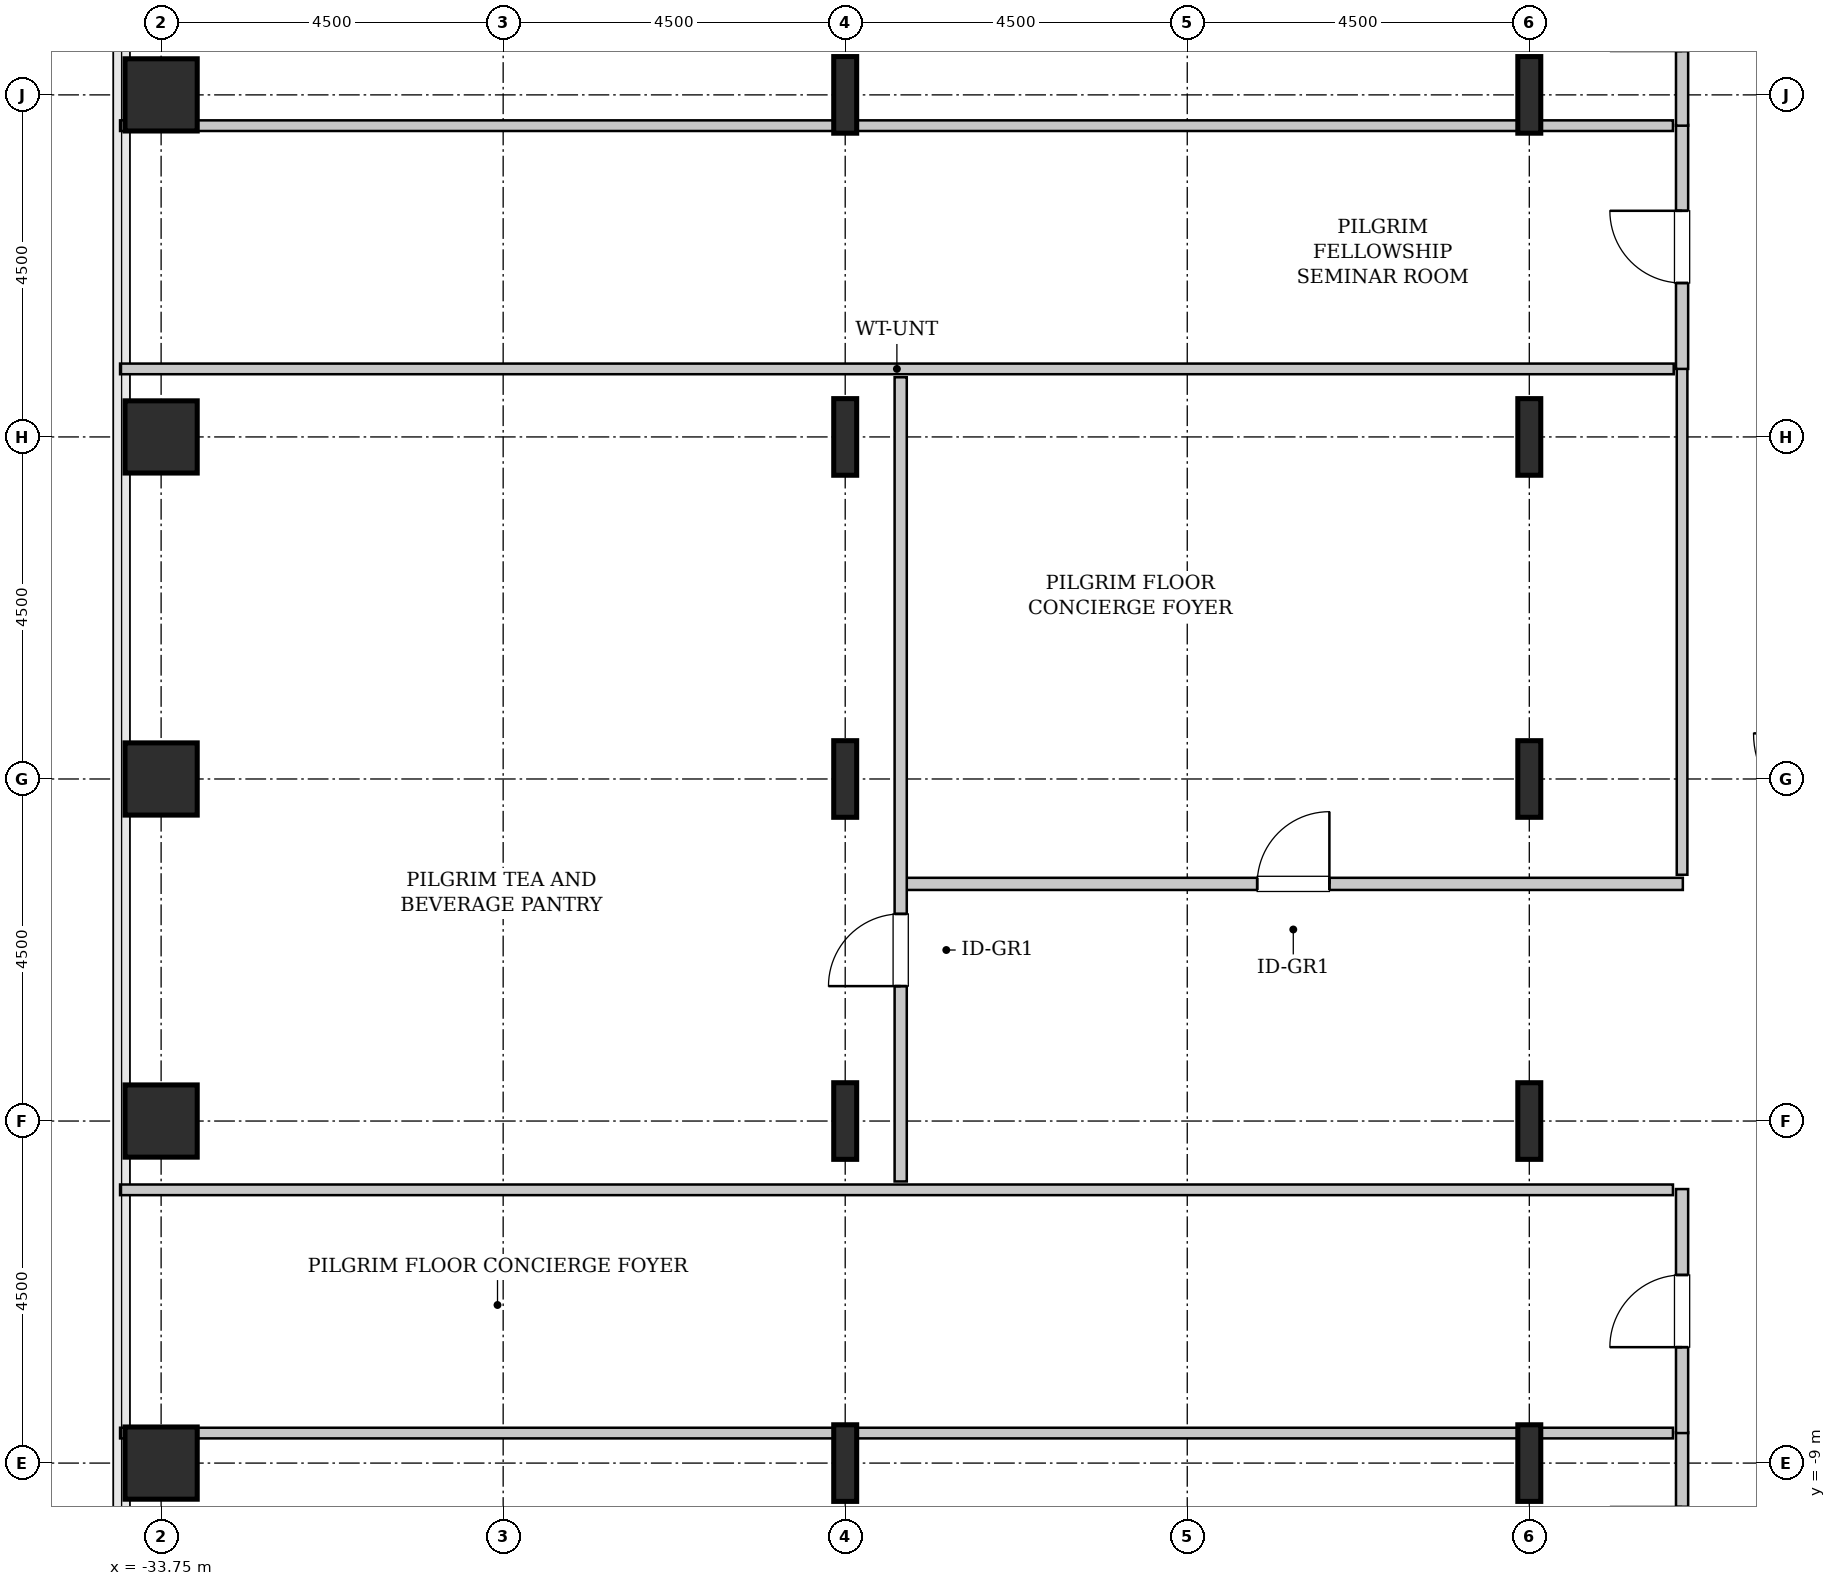
"""IFC4 building model, lengths in metres.
Left out: names, types, materials, properties, quantities, classifications, styles, units other than length and angle.
Written with IfcOpenShell. Run it as: python <this file> out.ifc"""

import sys

from ifc_helpers import new_model, si_unit, direction, frame, frame_2d, origin, origin_2d, place, context, subcontext, project, spatial, rectangle, hollow_rectangle, i_section, extrude, source, transform, mapped, element, fill, save


model = new_model("IFC4")
c1 = context("Model", 3, precision=1e-05, world=origin(), true_north=direction((0.0, 1.0)))
c2 = subcontext(c1, "Body", "Model", "MODEL_VIEW")
j1 = project(units=[si_unit("LENGTHUNIT", "METRE"), si_unit("PLANEANGLEUNIT", "RADIAN")], contexts=[c1])
p1 = place(None, origin())
s1 = spatial("IfcSite", under=j1, at=p1, CompositionType="ELEMENT")
p2 = place(p1, origin())
s2 = spatial("IfcBuilding", under=s1, at=p2, CompositionType="ELEMENT")
p3 = place(p2, frame((0.0, 0.0, 71.0)))
s3 = spatial("IfcBuildingStorey", under=s2, at=p3, CompositionType="ELEMENT", Elevation=71.0)
m1 = source(origin(), c2, "Body", "SweptSolid", [
    extrude(hollow_rectangle(XDim=0.95, YDim=0.95, WallThickness=0.045, InnerFilletRadius=0.045, OuterFilletRadius=0.09, at=origin_2d()), origin(), (0.0, 0.0, 1.0), 3.8),
])
for number, where, z_axis, x_axis in (
    (1, (-33.75, -9.0, 0.0), (0.0, 0.0, 1.0), (1.0, 0.0, 0.0)),
    (2, (-33.75, -4.5, 0.0), (0.0, 0.0, 1.0), (1.0, 0.0, 0.0)),
    (3, (-33.75, 0.0, 0.0), (0.0, 0.0, 1.0), (1.0, 0.0, 0.0)),
    (4, (-33.75, 4.5, 0.0), (0.0, 0.0, 1.0), (1.0, 0.0, 0.0)),
    (5, (-33.75, 9.0, 0.0), (0.0, 0.0, 1.0), (1.0, 0.0, 0.0)),
):
    element("IfcColumn", number, at=place(p3, frame(where, z_axis=z_axis, x_axis=x_axis)), inside=s3, PredefinedType="COLUMN", context=c2, shape_type="MappedRepresentation", body=[
        mapped(m1, transform((0.0, 0.0, 0.0), x_axis=(1.0, 0.0, 0.0), y_axis=(0.0, 1.0, 0.0), z_axis=(0.0, 0.0, 1.0), scale=1.0)),
    ])
m2 = source(origin(), c2, "Body", "SweptSolid", [
    extrude(i_section(OverallWidth=0.302, OverallDepth=1.008, WebThickness=0.021, FlangeThickness=0.04, FilletRadius=0.03, at=origin_2d()), origin(), (0.0, 0.0, 1.0), 3.8),
])
for number, where, z_axis, x_axis in (
    (6, (-24.75, -9.0, 0.0), (0.0, 0.0, 1.0), (1.0, 0.0, 0.0)),
    (7, (-24.75, -4.5, 0.0), (0.0, 0.0, 1.0), (1.0, 0.0, 0.0)),
    (8, (-24.75, 0.0, 0.0), (0.0, 0.0, 1.0), (1.0, 0.0, 0.0)),
    (9, (-24.75, 4.5, 0.0), (0.0, 0.0, 1.0), (1.0, 0.0, 0.0)),
    (10, (-24.75, 9.0, 0.0), (0.0, 0.0, 1.0), (1.0, 0.0, 0.0)),
    (11, (-15.75, -9.0, 0.0), (0.0, 0.0, 1.0), (1.0, 0.0, 0.0)),
    (12, (-15.75, -4.5, 0.0), (0.0, 0.0, 1.0), (1.0, 0.0, 0.0)),
    (13, (-15.75, 0.0, 0.0), (0.0, 0.0, 1.0), (1.0, 0.0, 0.0)),
    (14, (-15.75, 4.5, 0.0), (0.0, 0.0, 1.0), (1.0, 0.0, 0.0)),
    (15, (-15.75, 9.0, 0.0), (0.0, 0.0, 1.0), (1.0, 0.0, 0.0)),
):
    element("IfcColumn", number, at=place(p3, frame(where, z_axis=z_axis, x_axis=x_axis)), inside=s3, PredefinedType="COLUMN", context=c2, shape_type="MappedRepresentation", body=[
        mapped(m2, transform((0.0, 0.0, 0.0), x_axis=(1.0, 0.0, 0.0), y_axis=(0.0, 1.0, 0.0), z_axis=(0.0, 0.0, 1.0), scale=1.0)),
    ])
m3 = source(origin(), c2, "Body", "SweptSolid", [
    extrude(rectangle(XDim=12.645, YDim=0.16, at=frame_2d((6.323, 0.0))), origin(), (0.0, 0.0, 1.0), 3.535),
])
p4 = place(p3, frame((-13.74, -21.24, 0.0), z_axis=(0.0, 0.0, 1.0), x_axis=(0.0, 1.0, 0.0)))
e16 = element("IfcWall", 16, at=p4, inside=s3, PredefinedType="PARTITIONING", context=c2, shape_type="MappedRepresentation", body=[
    mapped(m3, transform((0.0, 0.0, 0.0), x_axis=(1.0, 0.0, 0.0), y_axis=(0.0, 1.0, 0.0), z_axis=(0.0, 0.0, 1.0), scale=1.0)),
])
p5 = place(p4, frame((10.712, 0.0, 0.0)))
e17 = element("IfcOpeningElement", 17, at=p5, cuts=e16, PredefinedType="OPENING", context=c2, shape_type="SweptSolid", body=[
    extrude(rectangle(XDim=0.95, YDim=2.1, at=frame_2d((0.475, 1.05))), frame((0.0, 0.09, 0.0), z_axis=(0.0, -1.0, 0.0), x_axis=(1.0, 0.0, 0.0)), (0.0, 0.0, 1.0), 0.18),
])
m4 = source(origin(), c2, "Body", "SweptSolid", [
    extrude(rectangle(XDim=20.43, YDim=0.14, at=frame_2d((10.215, 0.0))), origin(), (0.0, 0.0, 1.0), 2.825),
])
p6 = place(p3, frame((-34.29, -8.605, 0.0), z_axis=(0.0, 0.0, 1.0), x_axis=(1.0, 0.0, 0.0)))
e18 = element("IfcWall", 18, at=p6, inside=s3, PredefinedType="PARTITIONING", context=c2, shape_type="MappedRepresentation", body=[
    mapped(m4, transform((0.0, 0.0, 0.0), x_axis=(1.0, 0.0, 0.0), y_axis=(0.0, 1.0, 0.0), z_axis=(0.0, 0.0, 1.0), scale=1.0)),
])
m5 = source(origin(), c2, "Body", "SweptSolid", [
    extrude(rectangle(XDim=3.21, YDim=0.16, at=frame_2d((1.605, 0.0))), origin(), (0.0, 0.0, 1.0), 3.535),
])
p7 = place(p3, frame((-13.74, -8.605, 0.0), z_axis=(0.0, 0.0, 1.0), x_axis=(0.0, 1.0, 0.0)))
e19 = element("IfcWall", 19, at=p7, inside=s3, PredefinedType="PARTITIONING", context=c2, shape_type="MappedRepresentation", body=[
    mapped(m5, transform((0.0, 0.0, 0.0), x_axis=(1.0, 0.0, 0.0), y_axis=(0.0, 1.0, 0.0), z_axis=(0.0, 0.0, 1.0), scale=1.0)),
])
p8 = place(p7, frame((1.13, 0.0, 0.0)))
e20 = element("IfcOpeningElement", 20, at=p8, cuts=e19, PredefinedType="OPENING", context=c2, shape_type="SweptSolid", body=[
    extrude(rectangle(XDim=0.95, YDim=2.1, at=frame_2d((0.475, 1.05))), frame((0.0, 0.09, 0.0), z_axis=(0.0, -1.0, 0.0), x_axis=(1.0, 0.0, 0.0)), (0.0, 0.0, 1.0), 0.18),
])
m6 = source(origin(), c2, "Body", "SweptSolid", [
    extrude(rectangle(XDim=20.43, YDim=0.14, at=frame_2d((10.215, 0.0))), origin(), (0.0, 0.0, 1.0), 3.535),
])
p9 = place(p3, frame((-34.29, -5.405, 0.0), z_axis=(0.0, 0.0, 1.0), x_axis=(1.0, 0.0, 0.0)))
e21 = element("IfcWall", 21, at=p9, inside=s3, PredefinedType="PARTITIONING", context=c2, shape_type="MappedRepresentation", body=[
    mapped(m6, transform((0.0, 0.0, 0.0), x_axis=(1.0, 0.0, 0.0), y_axis=(0.0, 1.0, 0.0), z_axis=(0.0, 0.0, 1.0), scale=1.0)),
])
m7 = source(origin(), c2, "Body", "SweptSolid", [
    extrude(rectangle(XDim=10.25, YDim=0.16, at=frame_2d((5.125, 0.0))), origin(), (0.0, 0.0, 1.0), 3.535),
])
p10 = place(p3, frame((-23.98, -1.38, 0.0), z_axis=(0.0, 0.0, 1.0), x_axis=(1.0, 0.0, 0.0)))
e22 = element("IfcWall", 22, at=p10, inside=s3, PredefinedType="PARTITIONING", context=c2, shape_type="MappedRepresentation", body=[
    mapped(m7, transform((0.0, 0.0, 0.0), x_axis=(1.0, 0.0, 0.0), y_axis=(0.0, 1.0, 0.0), z_axis=(0.0, 0.0, 1.0), scale=1.0)),
])
p11 = place(p10, frame((4.65, 0.0, 0.0)))
e23 = element("IfcOpeningElement", 23, at=p11, cuts=e22, PredefinedType="OPENING", context=c2, shape_type="SweptSolid", body=[
    extrude(rectangle(XDim=0.95, YDim=2.1, at=frame_2d((0.475, 1.05))), frame((0.0, 0.09, 0.0), z_axis=(0.0, -1.0, 0.0), x_axis=(1.0, 0.0, 0.0)), (0.0, 0.0, 1.0), 0.18),
])
m8 = source(origin(), c2, "Body", "SweptSolid", [
    extrude(rectangle(XDim=6.665, YDim=0.14, at=frame_2d((3.333, 0.0))), origin(), (0.0, 0.0, 1.0), 3.535),
])
p12 = place(p3, frame((-13.74, -1.26, 0.0), z_axis=(0.0, 0.0, 1.0), x_axis=(0.0, 1.0, 0.0)))
e24 = element("IfcWall", 24, at=p12, inside=s3, PredefinedType="PARTITIONING", context=c2, shape_type="MappedRepresentation", body=[
    mapped(m8, transform((0.0, 0.0, 0.0), x_axis=(1.0, 0.0, 0.0), y_axis=(0.0, 1.0, 0.0), z_axis=(0.0, 0.0, 1.0), scale=1.0)),
])
m9 = source(origin(), c2, "Body", "SweptSolid", [
    extrude(rectangle(XDim=20.44, YDim=0.14, at=frame_2d((10.22, 0.0))), origin(), (0.0, 0.0, 1.0), 3.535),
])
p13 = place(p3, frame((-34.29, 5.395, 0.0), z_axis=(0.0, 0.0, 1.0), x_axis=(1.0, 0.0, 0.0)))
e25 = element("IfcWall", 25, at=p13, inside=s3, PredefinedType="PARTITIONING", context=c2, shape_type="MappedRepresentation", body=[
    mapped(m9, transform((0.0, 0.0, 0.0), x_axis=(1.0, 0.0, 0.0), y_axis=(0.0, 1.0, 0.0), z_axis=(0.0, 0.0, 1.0), scale=1.0)),
])
m10 = source(origin(), c2, "Body", "SweptSolid", [
    extrude(rectangle(XDim=10.58, YDim=0.16, at=frame_2d((5.29, 0.0))), origin(), (0.0, 0.0, 1.0), 3.535),
])
p14 = place(p3, frame((-24.02, -5.295, 0.0), z_axis=(0.0, 0.0, 1.0), x_axis=(0.0, 1.0, 0.0)))
e26 = element("IfcWall", 26, at=p14, inside=s3, PredefinedType="PARTITIONING", context=c2, shape_type="MappedRepresentation", body=[
    mapped(m10, transform((0.0, 0.0, 0.0), x_axis=(1.0, 0.0, 0.0), y_axis=(0.0, 1.0, 0.0), z_axis=(0.0, 0.0, 1.0), scale=1.0)),
])
p15 = place(p14, frame((2.57, 0.0, 0.0)))
e27 = element("IfcOpeningElement", 27, at=p15, cuts=e26, PredefinedType="OPENING", context=c2, shape_type="SweptSolid", body=[
    extrude(rectangle(XDim=0.95, YDim=2.1, at=frame_2d((0.475, 1.05))), frame((0.0, 0.09, 0.0), z_axis=(0.0, -1.0, 0.0), x_axis=(1.0, 0.0, 0.0)), (0.0, 0.0, 1.0), 0.18),
])
p16 = place(p3, frame((-13.74, 5.395, 0.0), z_axis=(0.0, 0.0, 1.0), x_axis=(0.0, 1.0, 0.0)))
e28 = element("IfcWall", 28, at=p16, inside=s3, PredefinedType="PARTITIONING", context=c2, shape_type="MappedRepresentation", body=[
    mapped(m5, transform((0.0, 0.0, 0.0), x_axis=(1.0, 0.0, 0.0), y_axis=(0.0, 1.0, 0.0), z_axis=(0.0, 0.0, 1.0), scale=1.0)),
])
p17 = place(p16, frame((1.13, 0.0, 0.0)))
e29 = element("IfcOpeningElement", 29, at=p17, cuts=e28, PredefinedType="OPENING", context=c2, shape_type="SweptSolid", body=[
    extrude(rectangle(XDim=0.95, YDim=2.1, at=frame_2d((0.475, 1.05))), frame((0.0, 0.09, 0.0), z_axis=(0.0, -1.0, 0.0), x_axis=(1.0, 0.0, 0.0)), (0.0, 0.0, 1.0), 0.18),
])
p18 = place(p3, frame((-34.29, 8.595, 0.0), z_axis=(0.0, 0.0, 1.0), x_axis=(1.0, 0.0, 0.0)))
e30 = element("IfcWall", 30, at=p18, inside=s3, PredefinedType="PARTITIONING", context=c2, shape_type="MappedRepresentation", body=[
    mapped(m4, transform((0.0, 0.0, 0.0), x_axis=(1.0, 0.0, 0.0), y_axis=(0.0, 1.0, 0.0), z_axis=(0.0, 0.0, 1.0), scale=1.0)),
])
p19 = place(p3, frame((-13.74, 8.595, 0.0), z_axis=(0.0, 0.0, 1.0), x_axis=(0.0, 1.0, 0.0)))
e31 = element("IfcWall", 31, at=p19, inside=s3, PredefinedType="PARTITIONING", context=c2, shape_type="MappedRepresentation", body=[
    mapped(m3, transform((0.0, 0.0, 0.0), x_axis=(1.0, 0.0, 0.0), y_axis=(0.0, 1.0, 0.0), z_axis=(0.0, 0.0, 1.0), scale=1.0)),
])
p20 = place(p19, frame((0.982, 0.0, 0.0)))
e32 = element("IfcOpeningElement", 32, at=p20, cuts=e31, PredefinedType="OPENING", context=c2, shape_type="SweptSolid", body=[
    extrude(rectangle(XDim=0.95, YDim=2.1, at=frame_2d((0.475, 1.05))), frame((0.0, 0.09, 0.0), z_axis=(0.0, -1.0, 0.0), x_axis=(1.0, 0.0, 0.0)), (0.0, 0.0, 1.0), 0.18),
])
m11 = source(origin(), c2, "Body", "SweptSolid", [
    extrude(rectangle(XDim=0.95, YDim=2.1, at=frame_2d((0.475, 1.05))), frame((0.0, 0.025, 0.0), z_axis=(0.0, -1.0, 0.0), x_axis=(1.0, 0.0, 0.0)), (0.0, 0.0, 1.0), 0.05),
])
p21 = place(p8, origin())
e33 = element("IfcDoor", 33, at=p21, inside=s3, OperationType="SINGLE_SWING_LEFT", PredefinedType="DOOR", context=c2, shape_type="MappedRepresentation", body=[
    mapped(m11, transform((0.0, 0.0, 0.0), x_axis=(1.0, 0.0, 0.0), y_axis=(0.0, 1.0, 0.0), z_axis=(0.0, 0.0, 1.0), scale=1.0)),
])
fill(e20, e33)
p22 = place(p11, origin())
e34 = element("IfcDoor", 34, at=p22, inside=s3, OperationType="SINGLE_SWING_RIGHT", PredefinedType="DOOR", context=c2, shape_type="MappedRepresentation", body=[
    mapped(m11, transform((0.0, 0.0, 0.0), x_axis=(1.0, 0.0, 0.0), y_axis=(0.0, 1.0, 0.0), z_axis=(0.0, 0.0, 1.0), scale=1.0)),
])
fill(e23, e34)
p23 = place(p15, origin())
e35 = element("IfcDoor", 35, at=p23, inside=s3, OperationType="SINGLE_SWING_LEFT", PredefinedType="DOOR", context=c2, shape_type="MappedRepresentation", body=[
    mapped(m11, transform((0.0, 0.0, 0.0), x_axis=(1.0, 0.0, 0.0), y_axis=(0.0, 1.0, 0.0), z_axis=(0.0, 0.0, 1.0), scale=1.0)),
])
fill(e27, e35)
p24 = place(p17, origin())
e36 = element("IfcDoor", 36, at=p24, inside=s3, OperationType="SINGLE_SWING_RIGHT", PredefinedType="DOOR", context=c2, shape_type="MappedRepresentation", body=[
    mapped(m11, transform((0.0, 0.0, 0.0), x_axis=(1.0, 0.0, 0.0), y_axis=(0.0, 1.0, 0.0), z_axis=(0.0, 0.0, 1.0), scale=1.0)),
])
fill(e29, e36)
save(model, sys.argv[1])
